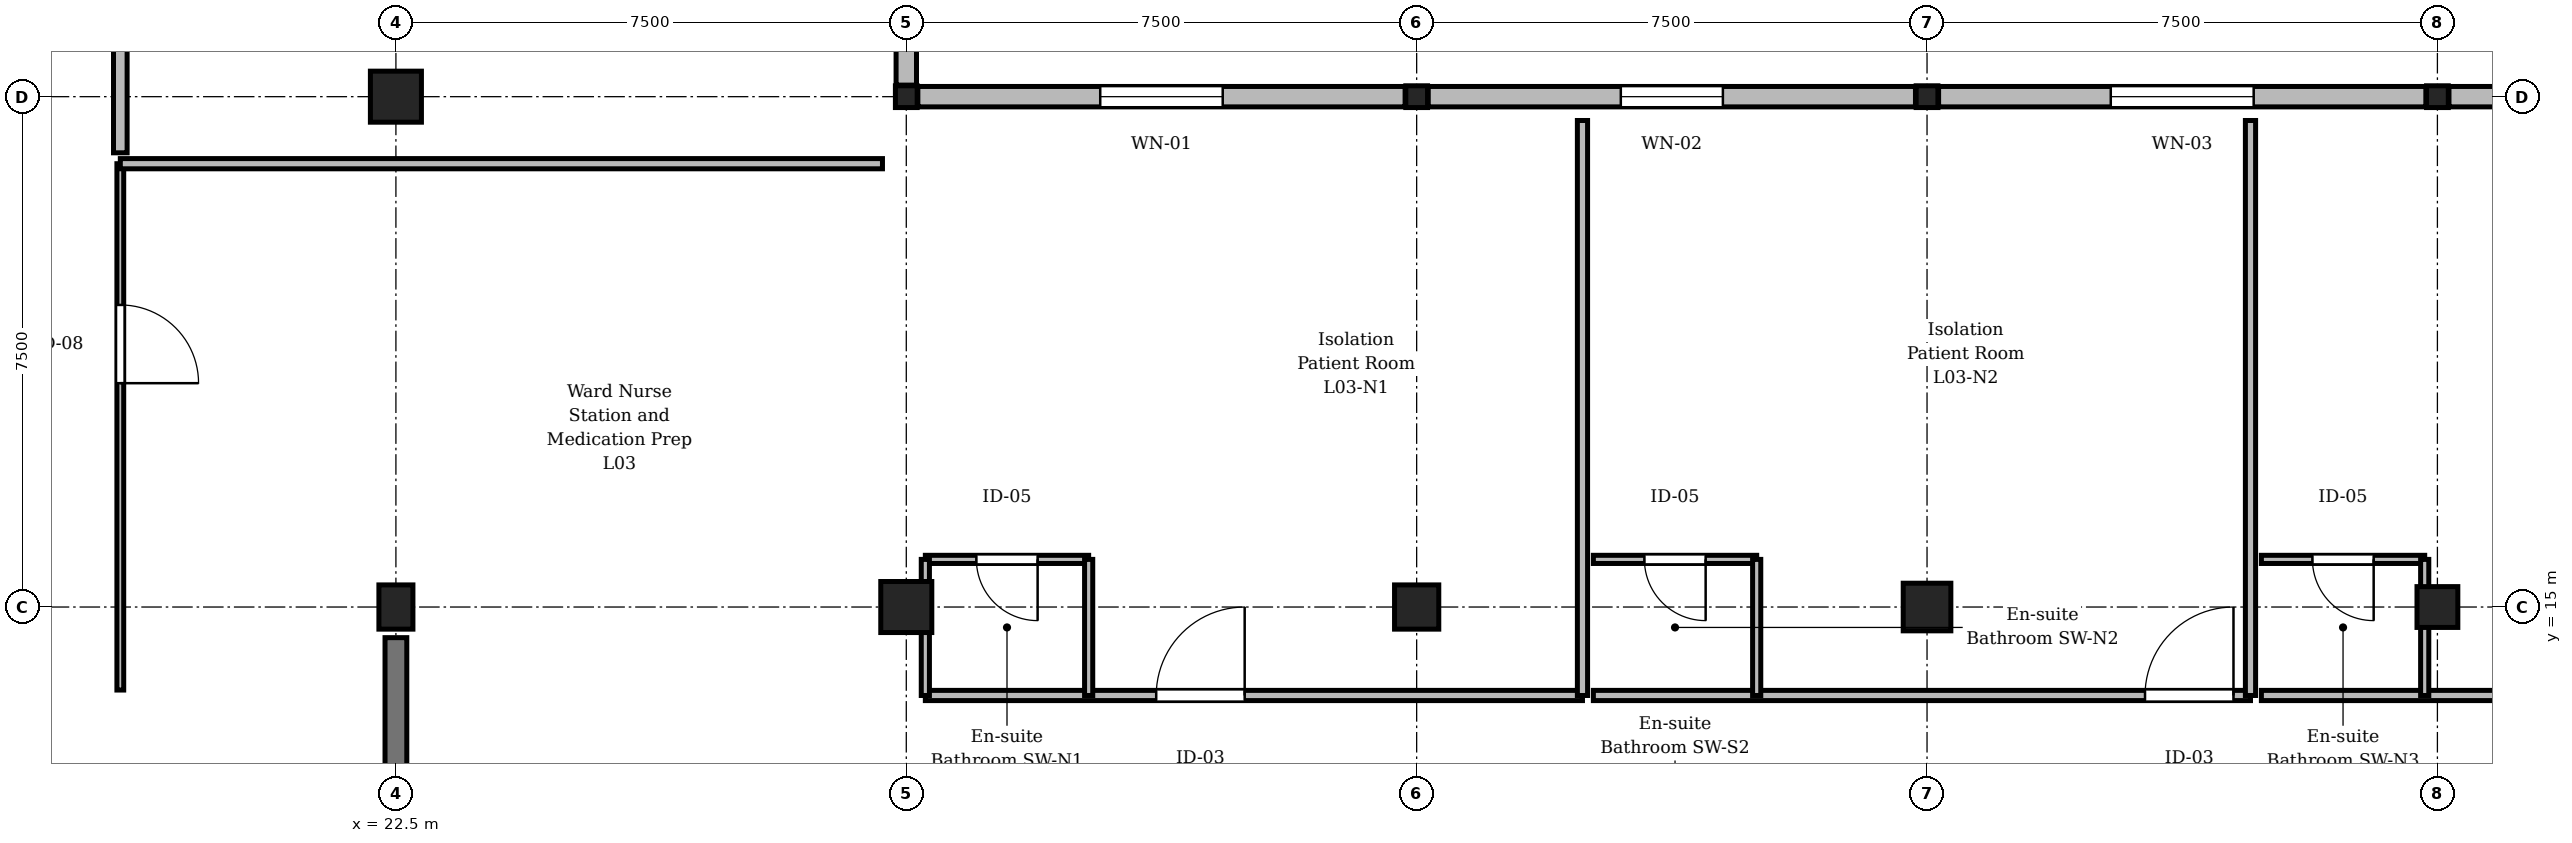
"""IFC4 building model, lengths in metres.
Left out: names, types, materials, properties, quantities, classifications, styles, units other than length and angle.
Written with IfcOpenShell. Run it as: python <this file> out.ifc"""

import sys

from ifc_helpers import new_model, si_unit, direction, frame, frame_2d, origin, origin_2d, place, context, subcontext, project, spatial, rectangle, circle, extrude, element, fill, save


model = new_model("IFC4")
c1 = context("Model", 3, precision=1e-05, world=origin(), true_north=direction((0.0, 1.0)))
c2 = subcontext(c1, "Body", "Model", "MODEL_VIEW")
j1 = project(units=[si_unit("LENGTHUNIT", "METRE"), si_unit("PLANEANGLEUNIT", "RADIAN")], contexts=[c1])
p1 = place(None, origin())
s1 = spatial("IfcSite", under=j1, at=p1, CompositionType="ELEMENT")
p2 = place(p1, origin())
s2 = spatial("IfcBuilding", under=s1, at=p2, CompositionType="ELEMENT")
p3 = place(p2, frame((0.0, 0.0, 14.1)))
s3 = spatial("IfcBuildingStorey", under=s2, at=p3, CompositionType="ELEMENT", Elevation=14.1)
p4 = place(p3, frame((22.5, 15.0, 0.0), z_axis=(0.0, 0.0, 1.0), x_axis=(1.0, 0.0, 0.0)))
e1 = element("IfcColumn", 1, at=p4, inside=s3, PredefinedType="COLUMN", context=c2, shape_type="SweptSolid", body=[
    extrude(rectangle(XDim=0.5, YDim=0.65, at=origin_2d()), origin(), (0.0, 0.0, 1.0), 3.75),
])
for number, where, z_axis, x_axis in (
    (2, (22.5, 22.5, 0.0), (0.0, 0.0, 1.0), (1.0, 0.0, 0.0)),
    (3, (30.0, 15.0, 0.0), (0.0, 0.0, 1.0), (1.0, 0.0, 0.0)),
):
    element("IfcColumn", number, at=place(p3, frame(where, z_axis=z_axis, x_axis=x_axis)), inside=s3, PredefinedType="COLUMN", context=c2, shape_type="SweptSolid", body=[
        extrude(rectangle(XDim=0.75, YDim=0.75, at=origin_2d()), origin(), (0.0, 0.0, 1.0), 3.75),
    ])
p5 = place(p3, frame((30.0, 22.5, 0.0), z_axis=(0.0, 0.0, 1.0), x_axis=(1.0, 0.0, 0.0)))
e4 = element("IfcColumn", 4, at=p5, inside=s3, PredefinedType="COLUMN", context=c2, shape_type="SweptSolid", body=[
    extrude(rectangle(XDim=0.32, YDim=0.32, at=origin_2d()), origin(), (0.0, 0.0, 1.0), 3.75),
])
p6 = place(p3, frame((37.5, 15.0, 0.0), z_axis=(0.0, 0.0, 1.0), x_axis=(1.0, 0.0, 0.0)))
e5 = element("IfcColumn", 5, at=p6, inside=s3, PredefinedType="COLUMN", context=c2, shape_type="SweptSolid", body=[
    extrude(rectangle(XDim=0.65, YDim=0.65, at=origin_2d()), origin(), (0.0, 0.0, 1.0), 3.75),
])
p7 = place(p3, frame((37.5, 22.5, 0.0), z_axis=(0.0, 0.0, 1.0), x_axis=(1.0, 0.0, 0.0)))
e6 = element("IfcColumn", 6, at=p7, inside=s3, PredefinedType="COLUMN", context=c2, shape_type="SweptSolid", body=[
    extrude(rectangle(XDim=0.32, YDim=0.32, at=origin_2d()), origin(), (0.0, 0.0, 1.0), 3.75),
])
p8 = place(p3, frame((45.0, 15.0, 0.0), z_axis=(0.0, 0.0, 1.0), x_axis=(1.0, 0.0, 0.0)))
e7 = element("IfcColumn", 7, at=p8, inside=s3, PredefinedType="COLUMN", context=c2, shape_type="SweptSolid", body=[
    extrude(rectangle(XDim=0.7, YDim=0.7, at=origin_2d()), origin(), (0.0, 0.0, 1.0), 3.75),
])
p9 = place(p3, frame((45.0, 22.5, 0.0), z_axis=(0.0, 0.0, 1.0), x_axis=(1.0, 0.0, 0.0)))
e8 = element("IfcColumn", 8, at=p9, inside=s3, PredefinedType="COLUMN", context=c2, shape_type="SweptSolid", body=[
    extrude(rectangle(XDim=0.32, YDim=0.32, at=origin_2d()), origin(), (0.0, 0.0, 1.0), 3.75),
])
p10 = place(p3, frame((52.5, 15.0, 0.0), z_axis=(0.0, 0.0, 1.0), x_axis=(1.0, 0.0, 0.0)))
e9 = element("IfcColumn", 9, at=p10, inside=s3, PredefinedType="COLUMN", context=c2, shape_type="SweptSolid", body=[
    extrude(circle(Radius=0.3, at=origin_2d()), origin(), (0.0, 0.0, 1.0), 3.75),
])
p11 = place(p3, frame((52.5, 22.5, 0.0), z_axis=(0.0, 0.0, 1.0), x_axis=(1.0, 0.0, 0.0)))
e10 = element("IfcColumn", 10, at=p11, inside=s3, PredefinedType="COLUMN", context=c2, shape_type="SweptSolid", body=[
    extrude(rectangle(XDim=0.32, YDim=0.32, at=origin_2d()), origin(), (0.0, 0.0, 1.0), 3.75),
])
p12 = place(p3, frame((22.5, 7.95, 0.0), z_axis=(0.0, 0.0, 1.0), x_axis=(0.0, 1.0, 0.0)))
e11 = element("IfcWall", 11, at=p12, inside=s3, PredefinedType="SHEAR", context=c2, shape_type="SweptSolid", body=[
    extrude(rectangle(XDim=6.6, YDim=0.32, at=frame_2d((3.3, 0.0))), origin(), (0.0, 0.0, 1.0), 2.92),
])
p13 = place(p3, frame((30.0, 31.33, 0.0), z_axis=(0.0, 0.0, 1.0), x_axis=(0.0, -1.0, 0.0)))
e12 = element("IfcWall", 12, at=p13, inside=s3, PredefinedType="STANDARD", context=c2, shape_type="SweptSolid", body=[
    extrude(rectangle(XDim=8.66, YDim=0.3, at=frame_2d((4.33, 0.0))), origin(), (0.0, 0.0, 1.0), 2.92),
])
p14 = place(p13, frame((3.43, 0.0, 0.9)))
e13 = element("IfcOpeningElement", 13, at=p14, cuts=e12, PredefinedType="OPENING", context=c2, shape_type="SweptSolid", body=[
    extrude(rectangle(XDim=1.8, YDim=1.74, at=frame_2d((0.9, 0.87))), frame((0.0, 0.16, 0.0), z_axis=(0.0, -1.0, 0.0), x_axis=(1.0, 0.0, 0.0)), (0.0, 0.0, 1.0), 0.32),
])
p15 = place(p3, frame((30.17, 22.5, 0.0), z_axis=(0.0, 0.0, 1.0), x_axis=(1.0, 0.0, 0.0)))
e14 = element("IfcWall", 14, at=p15, inside=s3, PredefinedType="STANDARD", context=c2, shape_type="SweptSolid", body=[
    extrude(rectangle(XDim=7.16, YDim=0.3, at=frame_2d((3.58, 0.0))), origin(), (0.0, 0.0, 1.0), 2.87),
])
p16 = place(p15, frame((2.68, 0.0, 0.9)))
e15 = element("IfcOpeningElement", 15, at=p16, cuts=e14, PredefinedType="OPENING", context=c2, shape_type="SweptSolid", body=[
    extrude(rectangle(XDim=1.8, YDim=1.69, at=frame_2d((0.9, 0.845))), frame((0.0, 0.16, 0.0), z_axis=(0.0, -1.0, 0.0), x_axis=(1.0, 0.0, 0.0)), (0.0, 0.0, 1.0), 0.32),
])
p17 = place(p3, frame((37.67, 22.5, 0.0), z_axis=(0.0, 0.0, 1.0), x_axis=(1.0, 0.0, 0.0)))
e16 = element("IfcWall", 16, at=p17, inside=s3, PredefinedType="STANDARD", context=c2, shape_type="SweptSolid", body=[
    extrude(rectangle(XDim=7.16, YDim=0.3, at=frame_2d((3.58, 0.0))), origin(), (0.0, 0.0, 1.0), 2.87),
])
p18 = place(p17, frame((2.83, 0.0, 0.9)))
e17 = element("IfcOpeningElement", 17, at=p18, cuts=e16, PredefinedType="OPENING", context=c2, shape_type="SweptSolid", body=[
    extrude(rectangle(XDim=1.5, YDim=1.69, at=frame_2d((0.75, 0.845))), frame((0.0, 0.16, 0.0), z_axis=(0.0, -1.0, 0.0), x_axis=(1.0, 0.0, 0.0)), (0.0, 0.0, 1.0), 0.32),
])
p19 = place(p3, frame((45.17, 22.5, 0.0), z_axis=(0.0, 0.0, 1.0), x_axis=(1.0, 0.0, 0.0)))
e18 = element("IfcWall", 18, at=p19, inside=s3, PredefinedType="STANDARD", context=c2, shape_type="SweptSolid", body=[
    extrude(rectangle(XDim=7.16, YDim=0.3, at=frame_2d((3.58, 0.0))), origin(), (0.0, 0.0, 1.0), 2.87),
])
p20 = place(p19, frame((2.53, 0.0, 0.9)))
e19 = element("IfcOpeningElement", 19, at=p20, cuts=e18, PredefinedType="OPENING", context=c2, shape_type="SweptSolid", body=[
    extrude(rectangle(XDim=2.1, YDim=1.69, at=frame_2d((1.05, 0.845))), frame((0.0, 0.16, 0.0), z_axis=(0.0, -1.0, 0.0), x_axis=(1.0, 0.0, 0.0)), (0.0, 0.0, 1.0), 0.32),
])
p21 = place(p3, frame((52.67, 22.5, 0.0), z_axis=(0.0, 0.0, 1.0), x_axis=(1.0, 0.0, 0.0)))
e20 = element("IfcWall", 20, at=p21, inside=s3, PredefinedType="STANDARD", context=c2, shape_type="SweptSolid", body=[
    extrude(rectangle(XDim=7.07, YDim=0.3, at=frame_2d((3.535, 0.0))), origin(), (0.0, 0.0, 1.0), 2.87),
])
p22 = place(p21, frame((2.335, 0.0, 0.9)))
e21 = element("IfcOpeningElement", 21, at=p22, cuts=e20, PredefinedType="OPENING", context=c2, shape_type="SweptSolid", body=[
    extrude(rectangle(XDim=2.4, YDim=1.69, at=frame_2d((1.2, 0.845))), frame((0.0, 0.16, 0.0), z_axis=(0.0, -1.0, 0.0), x_axis=(1.0, 0.0, 0.0)), (0.0, 0.0, 1.0), 0.32),
])
p23 = place(p3, frame((18.45, 21.515, 0.0), z_axis=(0.0, 0.0, 1.0), x_axis=(0.0, -1.0, 0.0)))
e22 = element("IfcWall", 22, at=p23, inside=s3, PredefinedType="PARTITIONING", context=c2, shape_type="SweptSolid", body=[
    extrude(rectangle(XDim=7.735, YDim=0.1, at=frame_2d((3.867, 0.0))), origin(), (0.0, 0.0, 1.0), 3.455),
])
p24 = place(p23, frame((2.075, 0.0, 0.0)))
e23 = element("IfcOpeningElement", 23, at=p24, cuts=e22, PredefinedType="OPENING", context=c2, shape_type="SweptSolid", body=[
    extrude(rectangle(XDim=1.15, YDim=2.2, at=frame_2d((0.575, 1.1))), frame((0.0, 0.06, 0.0), z_axis=(0.0, -1.0, 0.0), x_axis=(1.0, 0.0, 0.0)), (0.0, 0.0, 1.0), 0.12),
])
p25 = place(p3, frame((18.45, 29.41, 0.0), z_axis=(0.0, 0.0, 1.0), x_axis=(0.0, -1.0, 0.0)))
e24 = element("IfcWall", 24, at=p25, inside=s3, PredefinedType="STANDARD", context=c2, shape_type="SweptSolid", body=[
    extrude(rectangle(XDim=7.735, YDim=0.2, at=frame_2d((3.867, 0.0))), origin(), (0.0, 0.0, 1.0), 3.055),
])
p26 = place(p25, frame((2.075, 0.0, 0.0)))
e25 = element("IfcOpeningElement", 25, at=p26, cuts=e24, PredefinedType="OPENING", context=c2, shape_type="SweptSolid", body=[
    extrude(rectangle(XDim=1.15, YDim=2.2, at=frame_2d((0.575, 1.1))), frame((0.0, 0.11, 0.0), z_axis=(0.0, -1.0, 0.0), x_axis=(1.0, 0.0, 0.0)), (0.0, 0.0, 1.0), 0.22),
])
p27 = place(p3, frame((30.28, 13.7, 0.0), z_axis=(0.0, 0.0, 1.0), x_axis=(1.0, 0.0, 0.0)))
e26 = element("IfcWall", 26, at=p27, inside=s3, PredefinedType="PARTITIONING", context=c2, shape_type="SweptSolid", body=[
    extrude(rectangle(XDim=9.657, YDim=0.15, at=frame_2d((4.828, 0.0))), origin(), (0.0, 0.0, 1.0), 3.455),
])
p28 = place(p27, frame((3.393, 0.0, 0.0)))
e27 = element("IfcOpeningElement", 27, at=p28, cuts=e26, PredefinedType="OPENING", context=c2, shape_type="SweptSolid", body=[
    extrude(rectangle(XDim=1.3, YDim=2.2, at=frame_2d((0.65, 1.1))), frame((0.0, 0.085, 0.0), z_axis=(0.0, -1.0, 0.0), x_axis=(1.0, 0.0, 0.0)), (0.0, 0.0, 1.0), 0.17),
])
p29 = place(p3, frame((32.68, 15.7, 0.0), z_axis=(0.0, 0.0, 1.0), x_axis=(-1.0, 0.0, 0.0)))
e28 = element("IfcWall", 28, at=p29, inside=s3, PredefinedType="PARTITIONING", context=c2, shape_type="SweptSolid", body=[
    extrude(rectangle(XDim=2.4, YDim=0.12, at=frame_2d((1.2, 0.0))), origin(), (0.0, 0.0, 1.0), 3.455),
])
p30 = place(p29, frame((0.75, 0.0, 0.0)))
e29 = element("IfcOpeningElement", 29, at=p30, cuts=e28, PredefinedType="OPENING", context=c2, shape_type="SweptSolid", body=[
    extrude(rectangle(XDim=0.9, YDim=2.1, at=frame_2d((0.45, 1.05))), frame((0.0, 0.07, 0.0), z_axis=(0.0, -1.0, 0.0), x_axis=(1.0, 0.0, 0.0)), (0.0, 0.0, 1.0), 0.14),
])
p31 = place(p3, frame((32.68, 13.7, 0.0), z_axis=(0.0, 0.0, 1.0), x_axis=(0.0, 1.0, 0.0)))
e30 = element("IfcWall", 30, at=p31, inside=s3, PredefinedType="PARTITIONING", context=c2, shape_type="SweptSolid", body=[
    extrude(rectangle(XDim=2.0, YDim=0.12, at=frame_2d((1.0, 0.0))), origin(), (0.0, 0.0, 1.0), 3.455),
])
p32 = place(p3, frame((40.097, 13.7, 0.0), z_axis=(0.0, 0.0, 1.0), x_axis=(1.0, 0.0, 0.0)))
e31 = element("IfcWall", 31, at=p32, inside=s3, PredefinedType="PARTITIONING", context=c2, shape_type="SweptSolid", body=[
    extrude(rectangle(XDim=9.657, YDim=0.15, at=frame_2d((4.828, 0.0))), origin(), (0.0, 0.0, 1.0), 3.455),
])
p33 = place(p32, frame((8.107, 0.0, 0.0)))
e32 = element("IfcOpeningElement", 32, at=p33, cuts=e31, PredefinedType="OPENING", context=c2, shape_type="SweptSolid", body=[
    extrude(rectangle(XDim=1.3, YDim=2.2, at=frame_2d((0.65, 1.1))), frame((0.0, 0.085, 0.0), z_axis=(0.0, -1.0, 0.0), x_axis=(1.0, 0.0, 0.0)), (0.0, 0.0, 1.0), 0.17),
])
p34 = place(p3, frame((42.497, 15.7, 0.0), z_axis=(0.0, 0.0, 1.0), x_axis=(-1.0, 0.0, 0.0)))
e33 = element("IfcWall", 33, at=p34, inside=s3, PredefinedType="PARTITIONING", context=c2, shape_type="SweptSolid", body=[
    extrude(rectangle(XDim=2.4, YDim=0.12, at=frame_2d((1.2, 0.0))), origin(), (0.0, 0.0, 1.0), 3.455),
])
p35 = place(p34, frame((0.75, 0.0, 0.0)))
e34 = element("IfcOpeningElement", 34, at=p35, cuts=e33, PredefinedType="OPENING", context=c2, shape_type="SweptSolid", body=[
    extrude(rectangle(XDim=0.9, YDim=2.1, at=frame_2d((0.45, 1.05))), frame((0.0, 0.07, 0.0), z_axis=(0.0, -1.0, 0.0), x_axis=(1.0, 0.0, 0.0)), (0.0, 0.0, 1.0), 0.14),
])
p36 = place(p3, frame((42.497, 13.7, 0.0), z_axis=(0.0, 0.0, 1.0), x_axis=(0.0, 1.0, 0.0)))
e35 = element("IfcWall", 35, at=p36, inside=s3, PredefinedType="PARTITIONING", context=c2, shape_type="SweptSolid", body=[
    extrude(rectangle(XDim=2.0, YDim=0.12, at=frame_2d((1.0, 0.0))), origin(), (0.0, 0.0, 1.0), 3.455),
])
p37 = place(p3, frame((49.913, 13.7, 0.0), z_axis=(0.0, 0.0, 1.0), x_axis=(1.0, 0.0, 0.0)))
e36 = element("IfcWall", 36, at=p37, inside=s3, PredefinedType="PARTITIONING", context=c2, shape_type="SweptSolid", body=[
    extrude(rectangle(XDim=9.657, YDim=0.15, at=frame_2d((4.828, 0.0))), origin(), (0.0, 0.0, 1.0), 3.455),
])
p38 = place(p37, frame((5.75, 0.0, 0.0)))
e37 = element("IfcOpeningElement", 37, at=p38, cuts=e36, PredefinedType="OPENING", context=c2, shape_type="SweptSolid", body=[
    extrude(rectangle(XDim=1.3, YDim=2.2, at=frame_2d((0.65, 1.1))), frame((0.0, 0.085, 0.0), z_axis=(0.0, -1.0, 0.0), x_axis=(1.0, 0.0, 0.0)), (0.0, 0.0, 1.0), 0.17),
])
p39 = place(p3, frame((52.313, 15.7, 0.0), z_axis=(0.0, 0.0, 1.0), x_axis=(-1.0, 0.0, 0.0)))
e38 = element("IfcWall", 38, at=p39, inside=s3, PredefinedType="PARTITIONING", context=c2, shape_type="SweptSolid", body=[
    extrude(rectangle(XDim=2.4, YDim=0.12, at=frame_2d((1.2, 0.0))), origin(), (0.0, 0.0, 1.0), 3.455),
])
p40 = place(p39, frame((0.75, 0.0, 0.0)))
e39 = element("IfcOpeningElement", 39, at=p40, cuts=e38, PredefinedType="OPENING", context=c2, shape_type="SweptSolid", body=[
    extrude(rectangle(XDim=0.9, YDim=2.1, at=frame_2d((0.45, 1.05))), frame((0.0, 0.07, 0.0), z_axis=(0.0, -1.0, 0.0), x_axis=(1.0, 0.0, 0.0)), (0.0, 0.0, 1.0), 0.14),
])
p41 = place(p3, frame((52.313, 13.7, 0.0), z_axis=(0.0, 0.0, 1.0), x_axis=(0.0, 1.0, 0.0)))
e40 = element("IfcWall", 40, at=p41, inside=s3, PredefinedType="PARTITIONING", context=c2, shape_type="SweptSolid", body=[
    extrude(rectangle(XDim=2.0, YDim=0.12, at=frame_2d((1.0, 0.0))), origin(), (0.0, 0.0, 1.0), 2.905),
])
p42 = place(p3, frame((18.45, 21.515, 0.0), z_axis=(0.0, 0.0, 1.0), x_axis=(1.0, 0.0, 0.0)))
e41 = element("IfcWall", 41, at=p42, inside=s3, PredefinedType="PARTITIONING", context=c2, shape_type="SweptSolid", body=[
    extrude(rectangle(XDim=11.2, YDim=0.15, at=frame_2d((5.6, 0.0))), origin(), (0.0, 0.0, 1.0), 3.455),
])
for number, where, z_axis, x_axis in (
    (42, (39.937, 13.7, 0.0), (0.0, 0.0, 1.0), (0.0, 1.0, 0.0)),
    (43, (49.753, 13.7, 0.0), (0.0, 0.0, 1.0), (0.0, 1.0, 0.0)),
):
    element("IfcWall", number, at=place(p3, frame(where, z_axis=z_axis, x_axis=x_axis)), inside=s3, PredefinedType="PARTITIONING", context=c2, shape_type="SweptSolid", body=[
        extrude(rectangle(XDim=8.45, YDim=0.15, at=frame_2d((4.225, 0.0))), origin(), (0.0, 0.0, 1.0), 3.455),
    ])
p43 = place(p3, frame((30.28, 13.7, 0.0), z_axis=(0.0, 0.0, 1.0), x_axis=(0.0, 1.0, 0.0)))
e44 = element("IfcWall", 44, at=p43, inside=s3, PredefinedType="PARTITIONING", context=c2, shape_type="SweptSolid", body=[
    extrude(rectangle(XDim=2.0, YDim=0.12, at=frame_2d((1.0, 0.0))), origin(), (0.0, 0.0, 1.0), 2.905),
])
p44 = place(p16, origin())
e45 = element("IfcWindow", 45, at=p44, inside=s3, PartitioningType="SINGLE_PANEL", PredefinedType="WINDOW", context=c2, shape_type="SweptSolid", body=[
    extrude(rectangle(XDim=1.8, YDim=1.69, at=frame_2d((0.9, 0.845))), frame((0.0, 0.03, 0.0), z_axis=(0.0, -1.0, 0.0), x_axis=(1.0, 0.0, 0.0)), (0.0, 0.0, 1.0), 0.06),
])
fill(e15, e45)
p45 = place(p18, origin())
e46 = element("IfcWindow", 46, at=p45, inside=s3, PartitioningType="SINGLE_PANEL", PredefinedType="WINDOW", context=c2, shape_type="SweptSolid", body=[
    extrude(rectangle(XDim=1.5, YDim=1.69, at=frame_2d((0.75, 0.845))), frame((0.0, 0.03, 0.0), z_axis=(0.0, -1.0, 0.0), x_axis=(1.0, 0.0, 0.0)), (0.0, 0.0, 1.0), 0.06),
])
fill(e17, e46)
p46 = place(p20, origin())
e47 = element("IfcWindow", 47, at=p46, inside=s3, PartitioningType="SINGLE_PANEL", PredefinedType="WINDOW", context=c2, shape_type="SweptSolid", body=[
    extrude(rectangle(XDim=2.1, YDim=1.69, at=frame_2d((1.05, 0.845))), frame((0.0, 0.03, 0.0), z_axis=(0.0, -1.0, 0.0), x_axis=(1.0, 0.0, 0.0)), (0.0, 0.0, 1.0), 0.06),
])
fill(e19, e47)
p47 = place(p24, origin())
e48 = element("IfcDoor", 48, at=p47, inside=s3, OperationType="SINGLE_SWING_RIGHT", PredefinedType="DOOR", context=c2, shape_type="SweptSolid", body=[
    extrude(rectangle(XDim=1.15, YDim=2.2, at=frame_2d((0.575, 1.1))), frame((0.0, 0.025, 0.0), z_axis=(0.0, -1.0, 0.0), x_axis=(1.0, 0.0, 0.0)), (0.0, 0.0, 1.0), 0.05),
])
fill(e23, e48)
p48 = place(p28, origin())
e49 = element("IfcDoor", 49, at=p48, inside=s3, OperationType="SINGLE_SWING_RIGHT", PredefinedType="DOOR", context=c2, shape_type="SweptSolid", body=[
    extrude(rectangle(XDim=1.3, YDim=2.2, at=frame_2d((0.65, 1.1))), frame((0.0, 0.025, 0.0), z_axis=(0.0, -1.0, 0.0), x_axis=(1.0, 0.0, 0.0)), (0.0, 0.0, 1.0), 0.05),
])
fill(e27, e49)
p49 = place(p30, origin())
e50 = element("IfcDoor", 50, at=p49, inside=s3, OperationType="SINGLE_SWING_LEFT", PredefinedType="DOOR", context=c2, shape_type="SweptSolid", body=[
    extrude(rectangle(XDim=0.9, YDim=2.1, at=frame_2d((0.45, 1.05))), frame((0.0, 0.025, 0.0), z_axis=(0.0, -1.0, 0.0), x_axis=(1.0, 0.0, 0.0)), (0.0, 0.0, 1.0), 0.05),
])
fill(e29, e50)
p50 = place(p33, origin())
e51 = element("IfcDoor", 51, at=p50, inside=s3, OperationType="SINGLE_SWING_RIGHT", PredefinedType="DOOR", context=c2, shape_type="SweptSolid", body=[
    extrude(rectangle(XDim=1.3, YDim=2.2, at=frame_2d((0.65, 1.1))), frame((0.0, 0.025, 0.0), z_axis=(0.0, -1.0, 0.0), x_axis=(1.0, 0.0, 0.0)), (0.0, 0.0, 1.0), 0.05),
])
fill(e32, e51)
p51 = place(p35, origin())
e52 = element("IfcDoor", 52, at=p51, inside=s3, OperationType="SINGLE_SWING_LEFT", PredefinedType="DOOR", context=c2, shape_type="SweptSolid", body=[
    extrude(rectangle(XDim=0.9, YDim=2.1, at=frame_2d((0.45, 1.05))), frame((0.0, 0.025, 0.0), z_axis=(0.0, -1.0, 0.0), x_axis=(1.0, 0.0, 0.0)), (0.0, 0.0, 1.0), 0.05),
])
fill(e34, e52)
p52 = place(p40, origin())
e53 = element("IfcDoor", 53, at=p52, inside=s3, OperationType="SINGLE_SWING_LEFT", PredefinedType="DOOR", context=c2, shape_type="SweptSolid", body=[
    extrude(rectangle(XDim=0.9, YDim=2.1, at=frame_2d((0.45, 1.05))), frame((0.0, 0.025, 0.0), z_axis=(0.0, -1.0, 0.0), x_axis=(1.0, 0.0, 0.0)), (0.0, 0.0, 1.0), 0.05),
])
fill(e39, e53)
save(model, sys.argv[1])
